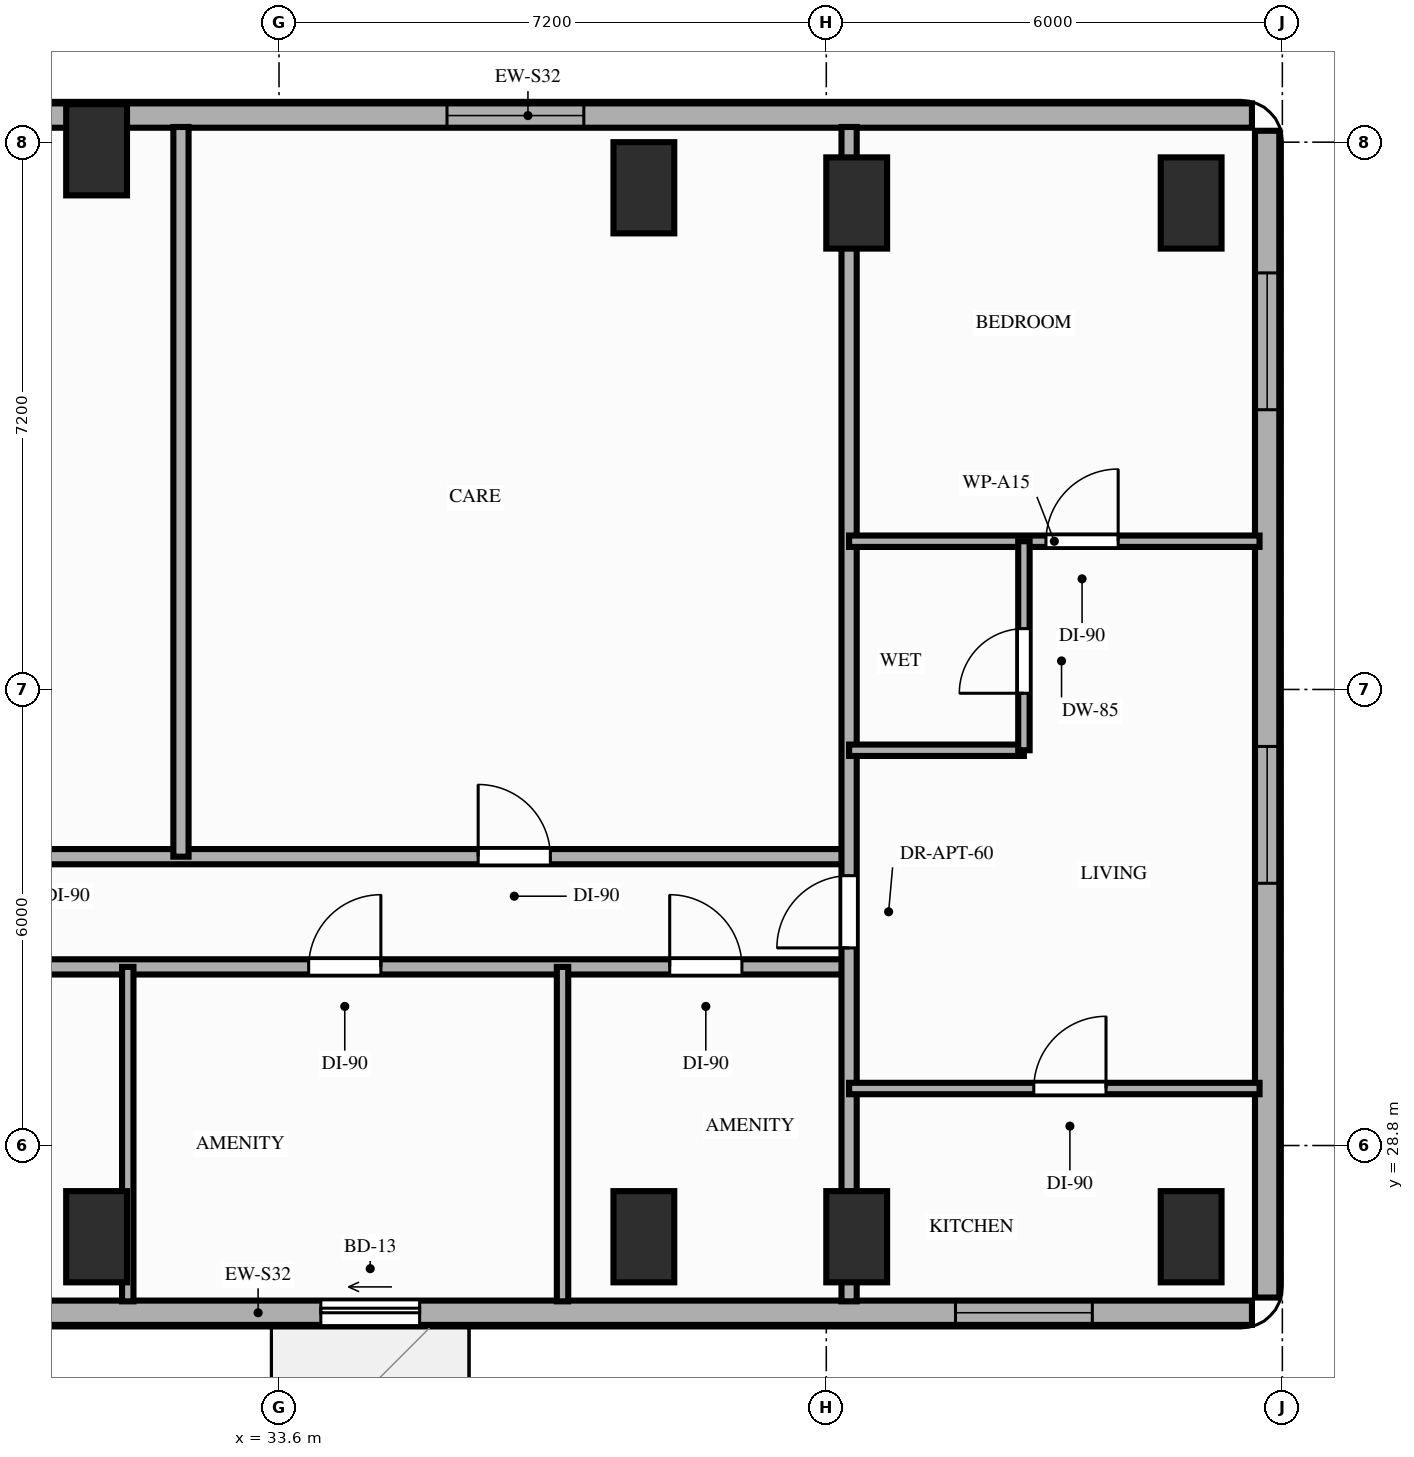
"""IFC4 building model, lengths in metres.
Left out: names, types, materials, properties, quantities, classifications, styles, units other than length and angle.
Written with IfcOpenShell. Run it as: python <this file> out.ifc"""

import sys

from ifc_helpers import new_model, si_unit, direction, frame, frame_2d, origin, origin_2d, place, context, subcontext, project, spatial, rectangle, extrude, element, fill, save


model = new_model("IFC4")
c1 = context("Model", 3, precision=1e-05, world=origin(), true_north=direction((0.0, 1.0)))
c2 = subcontext(c1, "Body", "Model", "MODEL_VIEW")
j1 = project(units=[si_unit("LENGTHUNIT", "METRE"), si_unit("PLANEANGLEUNIT", "RADIAN")], contexts=[c1])
p1 = place(None, origin())
s1 = spatial("IfcSite", under=j1, at=p1, CompositionType="ELEMENT")
p2 = place(p1, origin())
s2 = spatial("IfcBuilding", under=s1, at=p2, CompositionType="ELEMENT")
p3 = place(p2, frame((0.0, 0.0, 83.4)))
s3 = spatial("IfcBuildingStorey", under=s2, at=p3, CompositionType="ELEMENT", Elevation=83.4)
for number, where, z_axis, x_axis in (
    (1, (31.2, 27.6, 0.0), (0.0, 0.0, 1.0), (1.0, 0.0, 0.0)),
    (2, (31.2, 41.9, 0.0), (0.0, 0.0, 1.0), (1.0, 0.0, 0.0)),
    (3, (38.4, 27.6, 0.0), (0.0, 0.0, 1.0), (1.0, 0.0, 0.0)),
    (4, (38.4, 41.4, 0.0), (0.0, 0.0, 1.0), (1.0, 0.0, 0.0)),
    (5, (41.2, 27.6, 0.0), (0.0, 0.0, 1.0), (1.0, 0.0, 0.0)),
    (6, (41.2, 41.2, 0.0), (0.0, 0.0, 1.0), (1.0, 0.0, 0.0)),
    (7, (45.6, 27.6, 0.0), (0.0, 0.0, 1.0), (1.0, 0.0, 0.0)),
    (8, (45.6, 41.2, 0.0), (0.0, 0.0, 1.0), (1.0, 0.0, 0.0)),
):
    element("IfcColumn", number, at=place(p3, frame(where, z_axis=z_axis, x_axis=x_axis)), inside=s3, PredefinedType="COLUMN", context=c2, shape_type="SweptSolid", body=[
        extrude(rectangle(XDim=0.8, YDim=1.2, at=origin_2d()), origin(), (0.0, 0.0, 1.0), 3.2),
    ])
p4 = place(p3, frame((46.4, 42.35, 0.0), z_axis=(0.0, 0.0, 1.0), x_axis=(-1.0, 0.0, 0.0)))
e9 = element("IfcWall", 9, at=p4, inside=s3, PredefinedType="STANDARD", context=c2, shape_type="SweptSolid", body=[
    extrude(rectangle(XDim=19.05, YDim=0.32, at=frame_2d((9.525, 0.0))), origin(), (0.0, 0.0, 1.0), 2.41),
])
p5 = place(p4, frame((8.79, 0.0, 0.85)))
e10 = element("IfcOpeningElement", 10, at=p5, cuts=e9, PredefinedType="OPENING", context=c2, shape_type="SweptSolid", body=[
    extrude(rectangle(XDim=1.8, YDim=1.31, at=frame_2d((0.9, 0.655))), frame((0.0, 0.17, 0.0), z_axis=(0.0, -1.0, 0.0), x_axis=(1.0, 0.0, 0.0)), (0.0, 0.0, 1.0), 0.34),
])
p6 = place(p3, frame((20.25, 26.6, 0.0), z_axis=(0.0, 0.0, 1.0), x_axis=(1.0, 0.0, 0.0)))
e11 = element("IfcWall", 11, at=p6, inside=s3, PredefinedType="STANDARD", context=c2, shape_type="SweptSolid", body=[
    extrude(rectangle(XDim=26.15, YDim=0.32, at=frame_2d((13.075, 0.0))), origin(), (0.0, 0.0, 1.0), 2.71),
])
p7 = place(p6, frame((13.9, 0.0, 0.0)))
e12 = element("IfcOpeningElement", 12, at=p7, cuts=e11, PredefinedType="OPENING", context=c2, shape_type="SweptSolid", body=[
    extrude(rectangle(XDim=1.3, YDim=2.08, at=frame_2d((0.65, 1.04))), frame((0.0, 0.17, 0.0), z_axis=(0.0, -1.0, 0.0), x_axis=(1.0, 0.0, 0.0)), (0.0, 0.0, 1.0), 0.34),
])
p8 = place(p6, frame((2.25, 0.0, 0.85)))
e13 = element("IfcOpeningElement", 13, at=p8, cuts=e11, PredefinedType="OPENING", context=c2, shape_type="SweptSolid", body=[
    extrude(rectangle(XDim=1.8, YDim=1.61, at=frame_2d((0.9, 0.805))), frame((0.0, 0.17, 0.0), z_axis=(0.0, -1.0, 0.0), x_axis=(1.0, 0.0, 0.0)), (0.0, 0.0, 1.0), 0.34),
])
p9 = place(p6, frame((7.75, 0.0, 0.85)))
e14 = element("IfcOpeningElement", 14, at=p9, cuts=e11, PredefinedType="OPENING", context=c2, shape_type="SweptSolid", body=[
    extrude(rectangle(XDim=1.8, YDim=1.61, at=frame_2d((0.9, 0.805))), frame((0.0, 0.17, 0.0), z_axis=(0.0, -1.0, 0.0), x_axis=(1.0, 0.0, 0.0)), (0.0, 0.0, 1.0), 0.34),
])
p10 = place(p6, frame((22.25, 0.0, 0.85)))
e15 = element("IfcOpeningElement", 15, at=p10, cuts=e11, PredefinedType="OPENING", context=c2, shape_type="SweptSolid", body=[
    extrude(rectangle(XDim=1.8, YDim=1.61, at=frame_2d((0.9, 0.805))), frame((0.0, 0.17, 0.0), z_axis=(0.0, -1.0, 0.0), x_axis=(1.0, 0.0, 0.0)), (0.0, 0.0, 1.0), 0.34),
])
p11 = place(p3, frame((46.6, 26.8, 0.0), z_axis=(0.0, 0.0, 1.0), x_axis=(0.0, 1.0, 0.0)))
e16 = element("IfcWall", 16, at=p11, inside=s3, PredefinedType="STANDARD", context=c2, shape_type="SweptSolid", body=[
    extrude(rectangle(XDim=15.35, YDim=0.32, at=frame_2d((7.675, 0.0))), origin(), (0.0, 0.0, 1.0), 3.02),
])
p12 = place(p11, frame((5.45, 0.0, 0.85)))
e17 = element("IfcOpeningElement", 17, at=p12, cuts=e16, PredefinedType="OPENING", context=c2, shape_type="SweptSolid", body=[
    extrude(rectangle(XDim=1.8, YDim=1.75, at=frame_2d((0.9, 0.875))), frame((0.0, 0.17, 0.0), z_axis=(0.0, -1.0, 0.0), x_axis=(1.0, 0.0, 0.0)), (0.0, 0.0, 1.0), 0.34),
])
p13 = place(p11, frame((11.68, 0.0, 0.85)))
e18 = element("IfcOpeningElement", 18, at=p13, cuts=e16, PredefinedType="OPENING", context=c2, shape_type="SweptSolid", body=[
    extrude(rectangle(XDim=1.8, YDim=1.75, at=frame_2d((0.9, 0.875))), frame((0.0, 0.17, 0.0), z_axis=(0.0, -1.0, 0.0), x_axis=(1.0, 0.0, 0.0)), (0.0, 0.0, 1.0), 0.34),
])
p14 = place(p3, frame((27.15, 31.15, 0.0), z_axis=(0.0, 0.0, 1.0), x_axis=(1.0, 0.0, 0.0)))
e19 = element("IfcWall", 19, at=p14, inside=s3, PredefinedType="PARTITIONING", context=c2, shape_type="SweptSolid", body=[
    extrude(rectangle(XDim=13.95, YDim=0.2, at=frame_2d((6.975, 0.0))), origin(), (0.0, 0.0, 1.0), 2.41),
])
p15 = place(p14, frame((1.75, 0.0, 0.0)))
e20 = element("IfcOpeningElement", 20, at=p15, cuts=e19, PredefinedType="OPENING", context=c2, shape_type="SweptSolid", body=[
    extrude(rectangle(XDim=0.95, YDim=2.15, at=frame_2d((0.475, 1.075))), frame((0.0, 0.11, 0.0), z_axis=(0.0, -1.0, 0.0), x_axis=(1.0, 0.0, 0.0)), (0.0, 0.0, 1.0), 0.22),
])
p16 = place(p14, frame((6.84, 0.0, 0.0)))
e21 = element("IfcOpeningElement", 21, at=p16, cuts=e19, PredefinedType="OPENING", context=c2, shape_type="SweptSolid", body=[
    extrude(rectangle(XDim=0.95, YDim=2.15, at=frame_2d((0.475, 1.075))), frame((0.0, 0.11, 0.0), z_axis=(0.0, -1.0, 0.0), x_axis=(1.0, 0.0, 0.0)), (0.0, 0.0, 1.0), 0.22),
])
p17 = place(p14, frame((11.59, 0.0, 0.0)))
e22 = element("IfcOpeningElement", 22, at=p17, cuts=e19, PredefinedType="OPENING", context=c2, shape_type="SweptSolid", body=[
    extrude(rectangle(XDim=0.95, YDim=2.15, at=frame_2d((0.475, 1.075))), frame((0.0, 0.11, 0.0), z_axis=(0.0, -1.0, 0.0), x_axis=(1.0, 0.0, 0.0)), (0.0, 0.0, 1.0), 0.22),
])
p18 = place(p3, frame((27.15, 32.6, 0.0), z_axis=(0.0, 0.0, 1.0), x_axis=(1.0, 0.0, 0.0)))
e23 = element("IfcWall", 23, at=p18, inside=s3, PredefinedType="PARTITIONING", context=c2, shape_type="SweptSolid", body=[
    extrude(rectangle(XDim=13.95, YDim=0.2, at=frame_2d((6.975, 0.0))), origin(), (0.0, 0.0, 1.0), 2.41),
])
p19 = place(p18, frame((2.1, 0.0, 0.0)))
e24 = element("IfcOpeningElement", 24, at=p19, cuts=e23, PredefinedType="OPENING", context=c2, shape_type="SweptSolid", body=[
    extrude(rectangle(XDim=0.95, YDim=2.15, at=frame_2d((0.475, 1.075))), frame((0.0, 0.11, 0.0), z_axis=(0.0, -1.0, 0.0), x_axis=(1.0, 0.0, 0.0)), (0.0, 0.0, 1.0), 0.22),
])
p20 = place(p18, frame((9.07, 0.0, 0.0)))
e25 = element("IfcOpeningElement", 25, at=p20, cuts=e23, PredefinedType="OPENING", context=c2, shape_type="SweptSolid", body=[
    extrude(rectangle(XDim=0.95, YDim=2.15, at=frame_2d((0.475, 1.075))), frame((0.0, 0.11, 0.0), z_axis=(0.0, -1.0, 0.0), x_axis=(1.0, 0.0, 0.0)), (0.0, 0.0, 1.0), 0.22),
])
p21 = place(p3, frame((41.1, 26.75, 0.0), z_axis=(0.0, 0.0, 1.0), x_axis=(0.0, 1.0, 0.0)))
e26 = element("IfcWall", 26, at=p21, inside=s3, PredefinedType="PARTITIONING", context=c2, shape_type="SweptSolid", body=[
    extrude(rectangle(XDim=15.45, YDim=0.2, at=frame_2d((7.725, 0.0))), origin(), (0.0, 0.0, 1.0), 2.41),
])
p22 = place(p21, frame((4.65, 0.0, 0.0)))
e27 = element("IfcOpeningElement", 27, at=p22, cuts=e26, PredefinedType="OPENING", context=c2, shape_type="SweptSolid", body=[
    extrude(rectangle(XDim=0.95, YDim=2.15, at=frame_2d((0.475, 1.075))), frame((0.0, 0.11, 0.0), z_axis=(0.0, -1.0, 0.0), x_axis=(1.0, 0.0, 0.0)), (0.0, 0.0, 1.0), 0.22),
])
p23 = place(p3, frame((41.1, 29.55, 0.0), z_axis=(0.0, 0.0, 1.0), x_axis=(1.0, 0.0, 0.0)))
e28 = element("IfcWall", 28, at=p23, inside=s3, PredefinedType="PARTITIONING", context=c2, shape_type="SweptSolid", body=[
    extrude(rectangle(XDim=5.4, YDim=0.15, at=frame_2d((2.7, 0.0))), origin(), (0.0, 0.0, 1.0), 2.41),
])
p24 = place(p23, frame((2.43, 0.0, 0.0)))
e29 = element("IfcOpeningElement", 29, at=p24, cuts=e28, PredefinedType="OPENING", context=c2, shape_type="SweptSolid", body=[
    extrude(rectangle(XDim=0.95, YDim=2.15, at=frame_2d((0.475, 1.075))), frame((0.0, 0.085, 0.0), z_axis=(0.0, -1.0, 0.0), x_axis=(1.0, 0.0, 0.0)), (0.0, 0.0, 1.0), 0.17),
])
p25 = place(p3, frame((41.1, 36.75, 0.0), z_axis=(0.0, 0.0, 1.0), x_axis=(1.0, 0.0, 0.0)))
e30 = element("IfcWall", 30, at=p25, inside=s3, PredefinedType="PARTITIONING", context=c2, shape_type="SweptSolid", body=[
    extrude(rectangle(XDim=5.4, YDim=0.15, at=frame_2d((2.7, 0.0))), origin(), (0.0, 0.0, 1.0), 2.41),
])
p26 = place(p25, frame((2.59, 0.0, 0.0)))
e31 = element("IfcOpeningElement", 31, at=p26, cuts=e30, PredefinedType="OPENING", context=c2, shape_type="SweptSolid", body=[
    extrude(rectangle(XDim=0.95, YDim=2.15, at=frame_2d((0.475, 1.075))), frame((0.0, 0.085, 0.0), z_axis=(0.0, -1.0, 0.0), x_axis=(1.0, 0.0, 0.0)), (0.0, 0.0, 1.0), 0.17),
])
p27 = place(p3, frame((41.1, 34.0, 0.0), z_axis=(0.0, 0.0, 1.0), x_axis=(1.0, 0.0, 0.0)))
e32 = element("IfcWall", 32, at=p27, inside=s3, PredefinedType="PARTITIONING", context=c2, shape_type="SweptSolid", body=[
    extrude(rectangle(XDim=2.3, YDim=0.15, at=frame_2d((1.15, 0.0))), origin(), (0.0, 0.0, 1.0), 2.41),
])
p28 = place(p3, frame((43.4, 34.0, 0.0), z_axis=(0.0, 0.0, 1.0), x_axis=(0.0, 1.0, 0.0)))
e33 = element("IfcWall", 33, at=p28, inside=s3, PredefinedType="PARTITIONING", context=c2, shape_type="SweptSolid", body=[
    extrude(rectangle(XDim=2.75, YDim=0.15, at=frame_2d((1.375, 0.0))), origin(), (0.0, 0.0, 1.0), 2.6),
])
p29 = place(p28, frame((0.75, 0.0, 0.0)))
e34 = element("IfcOpeningElement", 34, at=p29, cuts=e33, PredefinedType="OPENING", context=c2, shape_type="SweptSolid", body=[
    extrude(rectangle(XDim=0.85, YDim=2.1, at=frame_2d((0.425, 1.05))), frame((0.0, 0.085, 0.0), z_axis=(0.0, -1.0, 0.0), x_axis=(1.0, 0.0, 0.0)), (0.0, 0.0, 1.0), 0.17),
])
for number, where, z_axis, x_axis in (
    (35, (31.61, 26.75, 0.0), (0.0, 0.0, 1.0), (0.0, 1.0, 0.0)),
    (36, (37.33, 26.75, 0.0), (0.0, 0.0, 1.0), (0.0, 1.0, 0.0)),
):
    element("IfcWall", number, at=place(p3, frame(where, z_axis=z_axis, x_axis=x_axis)), inside=s3, PredefinedType="PARTITIONING", context=c2, shape_type="SweptSolid", body=[
        extrude(rectangle(XDim=4.4, YDim=0.15, at=frame_2d((2.2, 0.0))), origin(), (0.0, 0.0, 1.0), 2.41),
    ])
p30 = place(p3, frame((32.31, 32.6, 0.0), z_axis=(0.0, 0.0, 1.0), x_axis=(0.0, 1.0, 0.0)))
e37 = element("IfcWall", 37, at=p30, inside=s3, PredefinedType="PARTITIONING", context=c2, shape_type="SweptSolid", body=[
    extrude(rectangle(XDim=9.6, YDim=0.2, at=frame_2d((4.8, 0.0))), origin(), (0.0, 0.0, 1.0), 2.41),
])
p31 = place(p7, origin())
e38 = element("IfcDoor", 38, at=p31, inside=s3, OperationType="SLIDING_TO_LEFT", PredefinedType="DOOR", context=c2, shape_type="SweptSolid", body=[
    extrude(rectangle(XDim=1.3, YDim=2.08, at=frame_2d((0.65, 1.04))), frame((0.0, 0.025, 0.0), z_axis=(0.0, -1.0, 0.0), x_axis=(1.0, 0.0, 0.0)), (0.0, 0.0, 1.0), 0.05),
])
fill(e12, e38)
p32 = place(p12, origin())
e39 = element("IfcWindow", 39, at=p32, inside=s3, PartitioningType="SINGLE_PANEL", PredefinedType="WINDOW", context=c2, shape_type="SweptSolid", body=[
    extrude(rectangle(XDim=1.8, YDim=1.75, at=frame_2d((0.9, 0.875))), frame((0.0, 0.03, 0.0), z_axis=(0.0, -1.0, 0.0), x_axis=(1.0, 0.0, 0.0)), (0.0, 0.0, 1.0), 0.06),
])
fill(e17, e39)
p33 = place(p13, origin())
e40 = element("IfcWindow", 40, at=p33, inside=s3, PartitioningType="SINGLE_PANEL", PredefinedType="WINDOW", context=c2, shape_type="SweptSolid", body=[
    extrude(rectangle(XDim=1.8, YDim=1.75, at=frame_2d((0.9, 0.875))), frame((0.0, 0.03, 0.0), z_axis=(0.0, -1.0, 0.0), x_axis=(1.0, 0.0, 0.0)), (0.0, 0.0, 1.0), 0.06),
])
fill(e18, e40)
p34 = place(p5, origin())
e41 = element("IfcWindow", 41, at=p34, inside=s3, PartitioningType="SINGLE_PANEL", PredefinedType="WINDOW", context=c2, shape_type="SweptSolid", body=[
    extrude(rectangle(XDim=1.8, YDim=1.31, at=frame_2d((0.9, 0.655))), frame((0.0, 0.03, 0.0), z_axis=(0.0, -1.0, 0.0), x_axis=(1.0, 0.0, 0.0)), (0.0, 0.0, 1.0), 0.06),
])
fill(e10, e41)
p35 = place(p10, origin())
e42 = element("IfcWindow", 42, at=p35, inside=s3, PartitioningType="SINGLE_PANEL", PredefinedType="WINDOW", context=c2, shape_type="SweptSolid", body=[
    extrude(rectangle(XDim=1.8, YDim=1.61, at=frame_2d((0.9, 0.805))), frame((0.0, 0.03, 0.0), z_axis=(0.0, -1.0, 0.0), x_axis=(1.0, 0.0, 0.0)), (0.0, 0.0, 1.0), 0.06),
])
fill(e15, e42)
p36 = place(p22, origin())
e43 = element("IfcDoor", 43, at=p36, inside=s3, OperationType="SINGLE_SWING_LEFT", PredefinedType="DOOR", context=c2, shape_type="SweptSolid", body=[
    extrude(rectangle(XDim=0.95, YDim=2.15, at=frame_2d((0.475, 1.075))), frame((0.0, 0.025, 0.0), z_axis=(0.0, -1.0, 0.0), x_axis=(1.0, 0.0, 0.0)), (0.0, 0.0, 1.0), 0.05),
])
fill(e27, e43)
p37 = place(p26, origin())
e44 = element("IfcDoor", 44, at=p37, inside=s3, OperationType="SINGLE_SWING_RIGHT", PredefinedType="DOOR", context=c2, shape_type="SweptSolid", body=[
    extrude(rectangle(XDim=0.95, YDim=2.15, at=frame_2d((0.475, 1.075))), frame((0.0, 0.025, 0.0), z_axis=(0.0, -1.0, 0.0), x_axis=(1.0, 0.0, 0.0)), (0.0, 0.0, 1.0), 0.05),
])
fill(e31, e44)
p38 = place(p29, origin())
e45 = element("IfcDoor", 45, at=p38, inside=s3, OperationType="SINGLE_SWING_LEFT", PredefinedType="DOOR", context=c2, shape_type="SweptSolid", body=[
    extrude(rectangle(XDim=0.85, YDim=2.1, at=frame_2d((0.425, 1.05))), frame((0.0, 0.025, 0.0), z_axis=(0.0, -1.0, 0.0), x_axis=(1.0, 0.0, 0.0)), (0.0, 0.0, 1.0), 0.05),
])
fill(e34, e45)
p39 = place(p24, origin())
e46 = element("IfcDoor", 46, at=p39, inside=s3, OperationType="SINGLE_SWING_RIGHT", PredefinedType="DOOR", context=c2, shape_type="SweptSolid", body=[
    extrude(rectangle(XDim=0.95, YDim=2.15, at=frame_2d((0.475, 1.075))), frame((0.0, 0.025, 0.0), z_axis=(0.0, -1.0, 0.0), x_axis=(1.0, 0.0, 0.0)), (0.0, 0.0, 1.0), 0.05),
])
fill(e29, e46)
p40 = place(p16, origin())
e47 = element("IfcDoor", 47, at=p40, inside=s3, OperationType="SINGLE_SWING_RIGHT", PredefinedType="DOOR", context=c2, shape_type="SweptSolid", body=[
    extrude(rectangle(XDim=0.95, YDim=2.15, at=frame_2d((0.475, 1.075))), frame((0.0, 0.025, 0.0), z_axis=(0.0, -1.0, 0.0), x_axis=(1.0, 0.0, 0.0)), (0.0, 0.0, 1.0), 0.05),
])
fill(e21, e47)
p41 = place(p17, origin())
e48 = element("IfcDoor", 48, at=p41, inside=s3, OperationType="SINGLE_SWING_LEFT", PredefinedType="DOOR", context=c2, shape_type="SweptSolid", body=[
    extrude(rectangle(XDim=0.95, YDim=2.15, at=frame_2d((0.475, 1.075))), frame((0.0, 0.025, 0.0), z_axis=(0.0, -1.0, 0.0), x_axis=(1.0, 0.0, 0.0)), (0.0, 0.0, 1.0), 0.05),
])
fill(e22, e48)
p42 = place(p20, origin())
e49 = element("IfcDoor", 49, at=p42, inside=s3, OperationType="SINGLE_SWING_LEFT", PredefinedType="DOOR", context=c2, shape_type="SweptSolid", body=[
    extrude(rectangle(XDim=0.95, YDim=2.15, at=frame_2d((0.475, 1.075))), frame((0.0, 0.025, 0.0), z_axis=(0.0, -1.0, 0.0), x_axis=(1.0, 0.0, 0.0)), (0.0, 0.0, 1.0), 0.05),
])
fill(e25, e49)
save(model, sys.argv[1])
